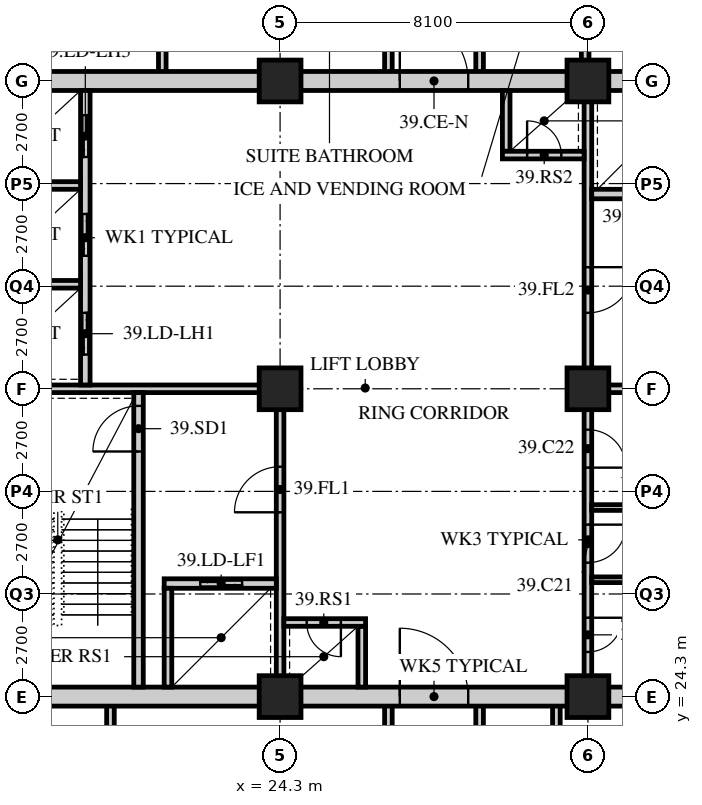
"""IFC4 building model, lengths in metres.
Left out: names, types, materials, properties, quantities, classifications, styles, units other than length and angle.
Written with IfcOpenShell. Run it as: python <this file> out.ifc"""

import sys

from ifc_helpers import new_model, si_unit, direction, frame, frame_2d, origin, origin_2d, place, context, subcontext, project, spatial, rectangle, hollow_rectangle, extrude, element, fill, save


model = new_model("IFC4")
c1 = context("Model", 3, precision=1e-05, world=origin(), true_north=direction((0.0, 1.0)))
c2 = subcontext(c1, "Body", "Model", "MODEL_VIEW")
j1 = project(units=[si_unit("LENGTHUNIT", "METRE"), si_unit("PLANEANGLEUNIT", "RADIAN")], contexts=[c1])
p1 = place(None, origin())
s1 = spatial("IfcSite", under=j1, at=p1, CompositionType="ELEMENT")
p2 = place(p1, origin())
s2 = spatial("IfcBuilding", under=s1, at=p2, CompositionType="ELEMENT")
p3 = place(p2, frame((0.0, 0.0, 151.0)))
s3 = spatial("IfcBuildingStorey", under=s2, at=p3, CompositionType="ELEMENT", Elevation=151.0)
for number, where, z_axis, x_axis in (
    (1, (24.3, 24.3, 0.0), (0.0, 0.0, 1.0), (1.0, 0.0, 0.0)),
    (2, (24.3, 32.4, 0.0), (0.0, 0.0, 1.0), (1.0, 0.0, 0.0)),
    (3, (24.3, 40.5, 0.0), (0.0, 0.0, 1.0), (1.0, 0.0, 0.0)),
    (4, (32.4, 24.3, 0.0), (0.0, 0.0, 1.0), (1.0, 0.0, 0.0)),
    (5, (32.4, 32.4, 0.0), (0.0, 0.0, 1.0), (1.0, 0.0, 0.0)),
    (6, (32.4, 40.5, 0.0), (0.0, 0.0, 1.0), (1.0, 0.0, 0.0)),
):
    element("IfcColumn", number, at=place(p3, frame(where, z_axis=z_axis, x_axis=x_axis)), inside=s3, PredefinedType="COLUMN", context=c2, shape_type="SweptSolid", body=[
        extrude(hollow_rectangle(XDim=1.1, YDim=1.1, WallThickness=0.1, at=origin_2d()), origin(), (0.0, 0.0, 1.0), 3.4),
    ])
for number, where, z_axis, x_axis in (
    (7, (19.836, 19.35, 0.0), (0.0, 0.0, 1.0), (0.0, 1.0, 0.0)),
    (8, (31.57, 19.35, 0.0), (0.0, 0.0, 1.0), (0.0, 1.0, 0.0)),
    (9, (27.15, 19.35, 0.0), (0.0, 0.0, 1.0), (0.0, 1.0, 0.0)),
    (10, (29.55, 19.35, 0.0), (0.0, 0.0, 1.0), (0.0, 1.0, 0.0)),
):
    element("IfcWall", number, at=place(p3, frame(where, z_axis=z_axis, x_axis=x_axis)), inside=s3, PredefinedType="SOLIDWALL", context=c2, shape_type="SweptSolid", body=[
        extrude(rectangle(XDim=4.95, YDim=0.2, at=frame_2d((2.475, 0.0))), origin(), (0.0, 0.0, 1.0), 3.19),
    ])
p4 = place(p3, frame((21.2, 44.1, 0.0), z_axis=(0.0, 0.0, 1.0), x_axis=(0.0, -1.0, 0.0)))
e11 = element("IfcWall", 11, at=p4, inside=s3, PredefinedType="SOLIDWALL", context=c2, shape_type="SweptSolid", body=[
    extrude(rectangle(XDim=3.6, YDim=0.2, at=frame_2d((1.8, 0.0))), origin(), (0.0, 0.0, 1.0), 3.19),
])
p5 = place(p3, frame((32.328, 44.1, 0.0), z_axis=(0.0, 0.0, 1.0), x_axis=(0.0, -1.0, 0.0)))
e12 = element("IfcWall", 12, at=p5, inside=s3, PredefinedType="SOLIDWALL", context=c2, shape_type="SweptSolid", body=[
    extrude(rectangle(XDim=3.6, YDim=0.2, at=frame_2d((1.8, 0.0))), origin(), (0.0, 0.0, 1.0), 2.42),
])
for number, where, z_axis, x_axis in (
    (13, (27.15, 40.5, 0.0), (0.0, 0.0, 1.0), (0.0, 1.0, 0.0)),
    (14, (29.55, 40.5, 0.0), (0.0, 0.0, 1.0), (0.0, 1.0, 0.0)),
):
    element("IfcWall", number, at=place(p3, frame(where, z_axis=z_axis, x_axis=x_axis)), inside=s3, PredefinedType="SOLIDWALL", context=c2, shape_type="SweptSolid", body=[
        extrude(rectangle(XDim=3.6, YDim=0.2, at=frame_2d((1.8, 0.0))), origin(), (0.0, 0.0, 1.0), 3.19),
    ])
p6 = place(p3, frame((15.95, 24.3, 0.0), z_axis=(0.0, 0.0, 1.0), x_axis=(1.0, 0.0, 0.0)))
e15 = element("IfcWall", 15, at=p6, inside=s3, PredefinedType="SOLIDWALL", context=c2, shape_type="SweptSolid", body=[
    extrude(rectangle(XDim=24.8, YDim=0.5, at=frame_2d((12.4, 0.0))), origin(), (0.0, 0.0, 1.0), 2.42),
])
p7 = place(p6, frame((11.5, 0.0, 0.0)))
e16 = element("IfcOpeningElement", 16, at=p7, cuts=e15, PredefinedType="OPENING", context=c2, shape_type="SweptSolid", body=[
    extrude(rectangle(XDim=1.8, YDim=2.4, at=frame_2d((0.9, 1.2))), frame((0.0, 0.26, 0.0), z_axis=(0.0, -1.0, 0.0), x_axis=(1.0, 0.0, 0.0)), (0.0, 0.0, 1.0), 0.52),
])
p8 = place(p3, frame((15.95, 40.5, 0.0), z_axis=(0.0, 0.0, 1.0), x_axis=(1.0, 0.0, 0.0)))
e17 = element("IfcWall", 17, at=p8, inside=s3, PredefinedType="SOLIDWALL", context=c2, shape_type="SweptSolid", body=[
    extrude(rectangle(XDim=24.8, YDim=0.5, at=frame_2d((12.4, 0.0))), origin(), (0.0, 0.0, 1.0), 2.42),
])
p9 = place(p8, frame((11.5, 0.0, 0.0)))
e18 = element("IfcOpeningElement", 18, at=p9, cuts=e17, PredefinedType="OPENING", context=c2, shape_type="SweptSolid", body=[
    extrude(rectangle(XDim=1.8, YDim=2.4, at=frame_2d((0.9, 1.2))), frame((0.0, 0.26, 0.0), z_axis=(0.0, -1.0, 0.0), x_axis=(1.0, 0.0, 0.0)), (0.0, 0.0, 1.0), 0.52),
])
p10 = place(p3, frame((16.45, 32.4, 0.0), z_axis=(0.0, 0.0, 1.0), x_axis=(1.0, 0.0, 0.0)))
e19 = element("IfcWall", 19, at=p10, inside=s3, PredefinedType="SOLIDWALL", context=c2, shape_type="SweptSolid", body=[
    extrude(rectangle(XDim=7.95, YDim=0.2, at=frame_2d((3.975, 0.0))), origin(), (0.0, 0.0, 1.0), 2.578),
])
p11 = place(p3, frame((24.3, 24.55, 0.0), z_axis=(0.0, 0.0, 1.0), x_axis=(0.0, 1.0, 0.0)))
e20 = element("IfcWall", 20, at=p11, inside=s3, PredefinedType="SOLIDWALL", context=c2, shape_type="SweptSolid", body=[
    extrude(rectangle(XDim=7.75, YDim=0.2, at=frame_2d((3.875, 0.0))), origin(), (0.0, 0.0, 1.0), 2.578),
])
p12 = place(p11, frame((4.6, 0.0, 0.0)))
e21 = element("IfcOpeningElement", 21, at=p12, cuts=e20, PredefinedType="OPENING", context=c2, shape_type="SweptSolid", body=[
    extrude(rectangle(XDim=1.2, YDim=2.1, at=frame_2d((0.6, 1.05))), frame((0.0, 0.11, 0.0), z_axis=(0.0, -1.0, 0.0), x_axis=(1.0, 0.0, 0.0)), (0.0, 0.0, 1.0), 0.22),
])
p13 = place(p3, frame((20.575, 24.55, 0.0), z_axis=(0.0, 0.0, 1.0), x_axis=(0.0, 1.0, 0.0)))
e22 = element("IfcWall", 22, at=p13, inside=s3, PredefinedType="SOLIDWALL", context=c2, shape_type="SweptSolid", body=[
    extrude(rectangle(XDim=7.75, YDim=0.25, at=frame_2d((3.875, 0.0))), origin(), (0.0, 0.0, 1.0), 3.19),
])
p14 = place(p13, frame((6.2, 0.0, 0.0)))
e23 = element("IfcOpeningElement", 23, at=p14, cuts=e22, PredefinedType="OPENING", context=c2, shape_type="SweptSolid", body=[
    extrude(rectangle(XDim=1.2, YDim=2.1, at=frame_2d((0.6, 1.05))), frame((0.0, 0.135, 0.0), z_axis=(0.0, -1.0, 0.0), x_axis=(1.0, 0.0, 0.0)), (0.0, 0.0, 1.0), 0.27),
])
p15 = place(p3, frame((21.25, 27.275, 0.0), z_axis=(0.0, 0.0, 1.0), x_axis=(1.0, 0.0, 0.0)))
e24 = element("IfcWall", 24, at=p15, inside=s3, PredefinedType="SOLIDWALL", context=c2, shape_type="SweptSolid", body=[
    extrude(rectangle(XDim=2.95, YDim=0.25, at=frame_2d((1.475, 0.0))), origin(), (0.0, 0.0, 1.0), 3.19),
])
p16 = place(p15, frame((0.95, 0.0, 0.0)))
e25 = element("IfcOpeningElement", 25, at=p16, cuts=e24, PredefinedType="OPENING", context=c2, shape_type="SweptSolid", body=[
    extrude(rectangle(XDim=1.1, YDim=2.4, at=frame_2d((0.55, 1.2))), frame((0.0, 0.135, 0.0), z_axis=(0.0, -1.0, 0.0), x_axis=(1.0, 0.0, 0.0)), (0.0, 0.0, 1.0), 0.27),
])
p17 = place(p3, frame((21.35, 24.55, 0.0), z_axis=(0.0, 0.0, 1.0), x_axis=(0.0, 1.0, 0.0)))
e26 = element("IfcWall", 26, at=p17, inside=s3, PredefinedType="SOLIDWALL", context=c2, shape_type="SweptSolid", body=[
    extrude(rectangle(XDim=2.6, YDim=0.2, at=frame_2d((1.3, 0.0))), origin(), (0.0, 0.0, 1.0), 3.19),
])
p18 = place(p3, frame((19.175, 32.5, 0.0), z_axis=(0.0, 0.0, 1.0), x_axis=(0.0, 1.0, 0.0)))
e27 = element("IfcWall", 27, at=p18, inside=s3, PredefinedType="SOLIDWALL", context=c2, shape_type="SweptSolid", body=[
    extrude(rectangle(XDim=7.75, YDim=0.25, at=frame_2d((3.875, 0.0))), origin(), (0.0, 0.0, 1.0), 3.19),
])
p19 = place(p18, frame((0.8, 0.0, 0.0)))
e28 = element("IfcOpeningElement", 28, at=p19, cuts=e27, PredefinedType="OPENING", context=c2, shape_type="SweptSolid", body=[
    extrude(rectangle(XDim=1.1, YDim=2.4, at=frame_2d((0.55, 1.2))), frame((0.0, 0.135, 0.0), z_axis=(0.0, -1.0, 0.0), x_axis=(1.0, 0.0, 0.0)), (0.0, 0.0, 1.0), 0.27),
])
p20 = place(p18, frame((3.4, 0.0, 0.0)))
e29 = element("IfcOpeningElement", 29, at=p20, cuts=e27, PredefinedType="OPENING", context=c2, shape_type="SweptSolid", body=[
    extrude(rectangle(XDim=1.1, YDim=2.4, at=frame_2d((0.55, 1.2))), frame((0.0, 0.135, 0.0), z_axis=(0.0, -1.0, 0.0), x_axis=(1.0, 0.0, 0.0)), (0.0, 0.0, 1.0), 0.27),
])
p21 = place(p18, frame((6.0, 0.0, 0.0)))
e30 = element("IfcOpeningElement", 30, at=p21, cuts=e27, PredefinedType="OPENING", context=c2, shape_type="SweptSolid", body=[
    extrude(rectangle(XDim=1.1, YDim=2.4, at=frame_2d((0.55, 1.2))), frame((0.0, 0.135, 0.0), z_axis=(0.0, -1.0, 0.0), x_axis=(1.0, 0.0, 0.0)), (0.0, 0.0, 1.0), 0.27),
])
for number, where, z_axis, x_axis in (
    (31, (16.45, 35.15, 0.0), (0.0, 0.0, 1.0), (1.0, 0.0, 0.0)),
    (32, (16.45, 37.75, 0.0), (0.0, 0.0, 1.0), (1.0, 0.0, 0.0)),
):
    element("IfcWall", number, at=place(p3, frame(where, z_axis=z_axis, x_axis=x_axis)), inside=s3, PredefinedType="SOLIDWALL", context=c2, shape_type="SweptSolid", body=[
        extrude(rectangle(XDim=2.6, YDim=0.2, at=frame_2d((1.3, 0.0))), origin(), (0.0, 0.0, 1.0), 3.19),
    ])
p22 = place(p3, frame((26.45, 24.55, 0.0), z_axis=(0.0, 0.0, 1.0), x_axis=(0.0, 1.0, 0.0)))
e33 = element("IfcWall", 33, at=p22, inside=s3, PredefinedType="SOLIDWALL", context=c2, shape_type="SweptSolid", body=[
    extrude(rectangle(XDim=1.6, YDim=0.2, at=frame_2d((0.8, 0.0))), origin(), (0.0, 0.0, 1.0), 3.19),
])
p23 = place(p3, frame((24.4, 26.25, 0.0), z_axis=(0.0, 0.0, 1.0), x_axis=(1.0, 0.0, 0.0)))
e34 = element("IfcWall", 34, at=p23, inside=s3, PredefinedType="SOLIDWALL", context=c2, shape_type="SweptSolid", body=[
    extrude(rectangle(XDim=2.15, YDim=0.2, at=frame_2d((1.075, 0.0))), origin(), (0.0, 0.0, 1.0), 3.19),
])
p24 = place(p23, frame((0.6, 0.0, 0.0)))
e35 = element("IfcOpeningElement", 35, at=p24, cuts=e34, PredefinedType="OPENING", context=c2, shape_type="SweptSolid", body=[
    extrude(rectangle(XDim=0.9, YDim=2.1, at=frame_2d((0.45, 1.05))), frame((0.0, 0.11, 0.0), z_axis=(0.0, -1.0, 0.0), x_axis=(1.0, 0.0, 0.0)), (0.0, 0.0, 1.0), 0.22),
])
p25 = place(p3, frame((32.3, 32.4, 0.0), z_axis=(0.0, 0.0, 1.0), x_axis=(1.0, 0.0, 0.0)))
e36 = element("IfcWall", 36, at=p25, inside=s3, PredefinedType="SOLIDWALL", context=c2, shape_type="SweptSolid", body=[
    extrude(rectangle(XDim=7.95, YDim=0.2, at=frame_2d((3.975, 0.0))), origin(), (0.0, 0.0, 1.0), 2.578),
])
p26 = place(p3, frame((32.4, 32.5, 0.0), z_axis=(0.0, 0.0, 1.0), x_axis=(0.0, 1.0, 0.0)))
e37 = element("IfcWall", 37, at=p26, inside=s3, PredefinedType="SOLIDWALL", context=c2, shape_type="SweptSolid", body=[
    extrude(rectangle(XDim=7.75, YDim=0.2, at=frame_2d((3.875, 0.0))), origin(), (0.0, 0.0, 1.0), 2.578),
])
p27 = place(p26, frame((1.9, 0.0, 0.0)))
e38 = element("IfcOpeningElement", 38, at=p27, cuts=e37, PredefinedType="OPENING", context=c2, shape_type="SweptSolid", body=[
    extrude(rectangle(XDim=1.2, YDim=2.1, at=frame_2d((0.6, 1.05))), frame((0.0, 0.11, 0.0), z_axis=(0.0, -1.0, 0.0), x_axis=(1.0, 0.0, 0.0)), (0.0, 0.0, 1.0), 0.22),
])
p28 = place(p3, frame((32.5, 37.525, 0.0), z_axis=(0.0, 0.0, 1.0), x_axis=(1.0, 0.0, 0.0)))
e39 = element("IfcWall", 39, at=p28, inside=s3, PredefinedType="SOLIDWALL", context=c2, shape_type="SweptSolid", body=[
    extrude(rectangle(XDim=2.95, YDim=0.25, at=frame_2d((1.475, 0.0))), origin(), (0.0, 0.0, 1.0), 3.19),
])
p29 = place(p28, frame((0.9, 0.0, 0.0)))
e40 = element("IfcOpeningElement", 40, at=p29, cuts=e39, PredefinedType="OPENING", context=c2, shape_type="SweptSolid", body=[
    extrude(rectangle(XDim=1.1, YDim=2.4, at=frame_2d((0.55, 1.2))), frame((0.0, 0.135, 0.0), z_axis=(0.0, -1.0, 0.0), x_axis=(1.0, 0.0, 0.0)), (0.0, 0.0, 1.0), 0.27),
])
p30 = place(p3, frame((30.25, 38.65, 0.0), z_axis=(0.0, 0.0, 1.0), x_axis=(0.0, 1.0, 0.0)))
e41 = element("IfcWall", 41, at=p30, inside=s3, PredefinedType="SOLIDWALL", context=c2, shape_type="SweptSolid", body=[
    extrude(rectangle(XDim=1.6, YDim=0.2, at=frame_2d((0.8, 0.0))), origin(), (0.0, 0.0, 1.0), 3.19),
])
p31 = place(p3, frame((30.15, 38.55, 0.0), z_axis=(0.0, 0.0, 1.0), x_axis=(1.0, 0.0, 0.0)))
e42 = element("IfcWall", 42, at=p31, inside=s3, PredefinedType="SOLIDWALL", context=c2, shape_type="SweptSolid", body=[
    extrude(rectangle(XDim=2.15, YDim=0.2, at=frame_2d((1.075, 0.0))), origin(), (0.0, 0.0, 1.0), 3.19),
])
p32 = place(p31, frame((0.65, 0.0, 0.0)))
e43 = element("IfcOpeningElement", 43, at=p32, cuts=e42, PredefinedType="OPENING", context=c2, shape_type="SweptSolid", body=[
    extrude(rectangle(XDim=0.9, YDim=2.1, at=frame_2d((0.45, 1.05))), frame((0.0, 0.11, 0.0), z_axis=(0.0, -1.0, 0.0), x_axis=(1.0, 0.0, 0.0)), (0.0, 0.0, 1.0), 0.22),
])
p33 = place(p3, frame((32.4, 24.55, 0.0), z_axis=(0.0, 0.0, 1.0), x_axis=(0.0, 1.0, 0.0)))
e44 = element("IfcWall", 44, at=p33, inside=s3, PredefinedType="PARTITIONING", context=c2, shape_type="SweptSolid", body=[
    extrude(rectangle(XDim=7.75, YDim=0.2, at=frame_2d((3.875, 0.0))), origin(), (0.0, 0.0, 1.0), 2.578),
])
p34 = place(p33, frame((0.925, 0.0, 0.0)))
e45 = element("IfcOpeningElement", 45, at=p34, cuts=e44, PredefinedType="OPENING", context=c2, shape_type="SweptSolid", body=[
    extrude(rectangle(XDim=0.9, YDim=2.1, at=frame_2d((0.45, 1.05))), frame((0.0, 0.11, 0.0), z_axis=(0.0, -1.0, 0.0), x_axis=(1.0, 0.0, 0.0)), (0.0, 0.0, 1.0), 0.22),
])
p35 = place(p33, frame((3.275, 0.0, 0.0)))
e46 = element("IfcOpeningElement", 46, at=p35, cuts=e44, PredefinedType="OPENING", context=c2, shape_type="SweptSolid", body=[
    extrude(rectangle(XDim=1.0, YDim=2.1, at=frame_2d((0.5, 1.05))), frame((0.0, 0.11, 0.0), z_axis=(0.0, -1.0, 0.0), x_axis=(1.0, 0.0, 0.0)), (0.0, 0.0, 1.0), 0.22),
])
p36 = place(p33, frame((5.775, 0.0, 0.0)))
e47 = element("IfcOpeningElement", 47, at=p36, cuts=e44, PredefinedType="OPENING", context=c2, shape_type="SweptSolid", body=[
    extrude(rectangle(XDim=1.0, YDim=2.1, at=frame_2d((0.5, 1.05))), frame((0.0, 0.11, 0.0), z_axis=(0.0, -1.0, 0.0), x_axis=(1.0, 0.0, 0.0)), (0.0, 0.0, 1.0), 0.22),
])
p37 = place(p3, frame((32.5, 27.375, 0.0), z_axis=(0.0, 0.0, 1.0), x_axis=(1.0, 0.0, 0.0)))
e48 = element("IfcWall", 48, at=p37, inside=s3, PredefinedType="PARTITIONING", context=c2, shape_type="SweptSolid", body=[
    extrude(rectangle(XDim=2.15, YDim=0.15, at=frame_2d((1.075, 0.0))), origin(), (0.0, 0.0, 1.0), 3.19),
])
p38 = place(p3, frame((32.5, 29.275, 0.0), z_axis=(0.0, 0.0, 1.0), x_axis=(1.0, 0.0, 0.0)))
e49 = element("IfcWall", 49, at=p38, inside=s3, PredefinedType="PARTITIONING", context=c2, shape_type="SweptSolid", body=[
    extrude(rectangle(XDim=4.9, YDim=0.15, at=frame_2d((2.45, 0.0))), origin(), (0.0, 0.0, 1.0), 3.19),
])
p39 = place(p34, origin())
e50 = element("IfcDoor", 50, at=p39, inside=s3, OperationType="SINGLE_SWING_LEFT", PredefinedType="DOOR", context=c2, shape_type="SweptSolid", body=[
    extrude(rectangle(XDim=0.9, YDim=2.1, at=frame_2d((0.45, 1.05))), frame((0.0, 0.025, 0.0), z_axis=(0.0, -1.0, 0.0), x_axis=(1.0, 0.0, 0.0)), (0.0, 0.0, 1.0), 0.05),
])
fill(e45, e50)
p40 = place(p35, origin())
e51 = element("IfcDoor", 51, at=p40, inside=s3, OperationType="SINGLE_SWING_LEFT", PredefinedType="DOOR", context=c2, shape_type="SweptSolid", body=[
    extrude(rectangle(XDim=1.0, YDim=2.1, at=frame_2d((0.5, 1.05))), frame((0.0, 0.025, 0.0), z_axis=(0.0, -1.0, 0.0), x_axis=(1.0, 0.0, 0.0)), (0.0, 0.0, 1.0), 0.05),
])
fill(e46, e51)
p41 = place(p36, origin())
e52 = element("IfcDoor", 52, at=p41, inside=s3, OperationType="SINGLE_SWING_RIGHT", PredefinedType="DOOR", context=c2, shape_type="SweptSolid", body=[
    extrude(rectangle(XDim=1.0, YDim=2.1, at=frame_2d((0.5, 1.05))), frame((0.0, 0.025, 0.0), z_axis=(0.0, -1.0, 0.0), x_axis=(1.0, 0.0, 0.0)), (0.0, 0.0, 1.0), 0.05),
])
fill(e47, e52)
p42 = place(p14, origin())
e53 = element("IfcDoor", 53, at=p42, inside=s3, OperationType="SINGLE_SWING_LEFT", PredefinedType="DOOR", context=c2, shape_type="SweptSolid", body=[
    extrude(rectangle(XDim=1.2, YDim=2.1, at=frame_2d((0.6, 1.05))), frame((0.0, 0.025, 0.0), z_axis=(0.0, -1.0, 0.0), x_axis=(1.0, 0.0, 0.0)), (0.0, 0.0, 1.0), 0.05),
])
fill(e23, e53)
p43 = place(p12, origin())
e54 = element("IfcDoor", 54, at=p43, inside=s3, OperationType="SINGLE_SWING_LEFT", PredefinedType="DOOR", context=c2, shape_type="SweptSolid", body=[
    extrude(rectangle(XDim=1.2, YDim=2.1, at=frame_2d((0.6, 1.05))), frame((0.0, 0.025, 0.0), z_axis=(0.0, -1.0, 0.0), x_axis=(1.0, 0.0, 0.0)), (0.0, 0.0, 1.0), 0.05),
])
fill(e21, e54)
p44 = place(p24, origin())
e55 = element("IfcDoor", 55, at=p44, inside=s3, OperationType="SINGLE_SWING_LEFT", PredefinedType="DOOR", context=c2, shape_type="SweptSolid", body=[
    extrude(rectangle(XDim=0.9, YDim=2.1, at=frame_2d((0.45, 1.05))), frame((0.0, 0.025, 0.0), z_axis=(0.0, -1.0, 0.0), x_axis=(1.0, 0.0, 0.0)), (0.0, 0.0, 1.0), 0.05),
])
fill(e35, e55)
p45 = place(p27, origin())
e56 = element("IfcDoor", 56, at=p45, inside=s3, OperationType="SINGLE_SWING_LEFT", PredefinedType="DOOR", context=c2, shape_type="SweptSolid", body=[
    extrude(rectangle(XDim=1.2, YDim=2.1, at=frame_2d((0.6, 1.05))), frame((0.0, 0.025, 0.0), z_axis=(0.0, -1.0, 0.0), x_axis=(1.0, 0.0, 0.0)), (0.0, 0.0, 1.0), 0.05),
])
fill(e38, e56)
p46 = place(p32, origin())
e57 = element("IfcDoor", 57, at=p46, inside=s3, OperationType="SINGLE_SWING_LEFT", PredefinedType="DOOR", context=c2, shape_type="SweptSolid", body=[
    extrude(rectangle(XDim=0.9, YDim=2.1, at=frame_2d((0.45, 1.05))), frame((0.0, 0.025, 0.0), z_axis=(0.0, -1.0, 0.0), x_axis=(1.0, 0.0, 0.0)), (0.0, 0.0, 1.0), 0.05),
])
fill(e43, e57)
p47 = place(p19, origin())
e58 = element("IfcDoor", 58, at=p47, inside=s3, OperationType="DOUBLE_DOOR_SLIDING", PredefinedType="DOOR", context=c2, shape_type="SweptSolid", body=[
    extrude(rectangle(XDim=1.1, YDim=2.4, at=frame_2d((0.55, 1.2))), frame((0.0, 0.025, 0.0), z_axis=(0.0, -1.0, 0.0), x_axis=(1.0, 0.0, 0.0)), (0.0, 0.0, 1.0), 0.05),
])
fill(e28, e58)
p48 = place(p20, origin())
e59 = element("IfcDoor", 59, at=p48, inside=s3, OperationType="DOUBLE_DOOR_SLIDING", PredefinedType="DOOR", context=c2, shape_type="SweptSolid", body=[
    extrude(rectangle(XDim=1.1, YDim=2.4, at=frame_2d((0.55, 1.2))), frame((0.0, 0.025, 0.0), z_axis=(0.0, -1.0, 0.0), x_axis=(1.0, 0.0, 0.0)), (0.0, 0.0, 1.0), 0.05),
])
fill(e29, e59)
p49 = place(p21, origin())
e60 = element("IfcDoor", 60, at=p49, inside=s3, OperationType="DOUBLE_DOOR_SLIDING", PredefinedType="DOOR", context=c2, shape_type="SweptSolid", body=[
    extrude(rectangle(XDim=1.1, YDim=2.4, at=frame_2d((0.55, 1.2))), frame((0.0, 0.025, 0.0), z_axis=(0.0, -1.0, 0.0), x_axis=(1.0, 0.0, 0.0)), (0.0, 0.0, 1.0), 0.05),
])
fill(e30, e60)
p50 = place(p16, origin())
e61 = element("IfcDoor", 61, at=p50, inside=s3, OperationType="DOUBLE_DOOR_SLIDING", PredefinedType="DOOR", context=c2, shape_type="SweptSolid", body=[
    extrude(rectangle(XDim=1.1, YDim=2.4, at=frame_2d((0.55, 1.2))), frame((0.0, 0.025, 0.0), z_axis=(0.0, -1.0, 0.0), x_axis=(1.0, 0.0, 0.0)), (0.0, 0.0, 1.0), 0.05),
])
fill(e25, e61)
p51 = place(p7, origin())
e62 = element("IfcDoor", 62, at=p51, inside=s3, OperationType="DOUBLE_DOOR_SINGLE_SWING", PredefinedType="DOOR", context=c2, shape_type="SweptSolid", body=[
    extrude(rectangle(XDim=1.8, YDim=2.4, at=frame_2d((0.9, 1.2))), frame((0.0, 0.025, 0.0), z_axis=(0.0, -1.0, 0.0), x_axis=(1.0, 0.0, 0.0)), (0.0, 0.0, 1.0), 0.05),
])
fill(e16, e62)
p52 = place(p9, origin())
e63 = element("IfcDoor", 63, at=p52, inside=s3, OperationType="DOUBLE_DOOR_SINGLE_SWING", PredefinedType="DOOR", context=c2, shape_type="SweptSolid", body=[
    extrude(rectangle(XDim=1.8, YDim=2.4, at=frame_2d((0.9, 1.2))), frame((0.0, 0.025, 0.0), z_axis=(0.0, -1.0, 0.0), x_axis=(1.0, 0.0, 0.0)), (0.0, 0.0, 1.0), 0.05),
])
fill(e18, e63)
save(model, sys.argv[1])
